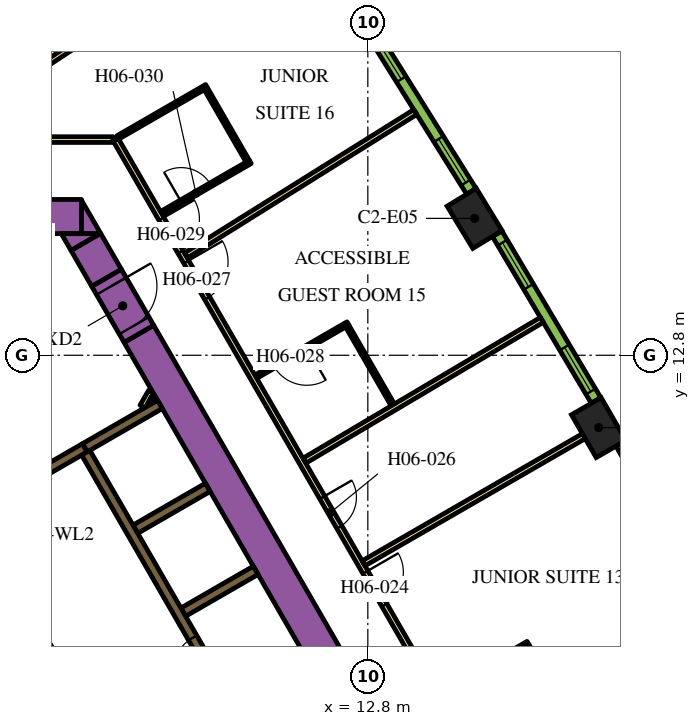
"""IFC4 building model, lengths in metres.
Left out: names, types, materials, properties, quantities, classifications, styles, units other than length and angle.
Written with IfcOpenShell. Run it as: python <this file> out.ifc"""

import sys

from ifc_helpers import new_model, si_unit, direction, frame, frame_2d, origin, origin_2d, place, context, subcontext, project, spatial, polyline, rectangle, outline, extrude, element, fill, save


model = new_model("IFC4")
c1 = context("Model", 3, precision=1e-05, world=origin(), true_north=direction((0.0, 1.0)))
c2 = subcontext(c1, "Body", "Model", "MODEL_VIEW")
j1 = project(units=[si_unit("LENGTHUNIT", "METRE"), si_unit("PLANEANGLEUNIT", "RADIAN")], contexts=[c1])
p1 = place(None, origin())
s1 = spatial("IfcSite", under=j1, at=p1, CompositionType="ELEMENT")
p2 = place(p1, origin())
s2 = spatial("IfcBuilding", under=s1, at=p2, CompositionType="ELEMENT")
p3 = place(p2, frame((0.0, 0.0, 87.6)))
s3 = spatial("IfcBuildingStorey", under=s2, at=p3, CompositionType="ELEMENT", Elevation=87.6)
for number, where, z_axis, x_axis in (
    (1, (18.874, 10.897, 0.0), (0.0, 0.0, 1.0), (-0.5, 0.866, 0.0)),
    (2, (15.609, 16.402, 0.0), (0.0, 0.0, 1.0), (-0.52, 0.854, 0.0)),
):
    element("IfcColumn", number, at=place(p3, frame(where, z_axis=z_axis, x_axis=x_axis)), inside=s3, PredefinedType="COLUMN", context=c2, shape_type="SweptSolid", body=[
        extrude(rectangle(XDim=1.3, YDim=0.9, at=origin_2d()), origin(), (0.0, 0.0, 1.0), 3.9),
    ])
p4 = place(p3, frame((6.776, 13.364, 0.0), z_axis=(0.0, 0.0, 1.0), x_axis=(0.500004177138, -0.8660229921, 0.0)))
e3 = element("IfcWall", 3, at=p4, inside=s3, PredefinedType="SOLIDWALL", context=c2, shape_type="SweptSolid", body=[
    extrude(rectangle(XDim=20.204, YDim=0.9, at=frame_2d((10.102, 0.0))), origin(), (0.0, 0.0, 1.0), 3.9),
])
p5 = place(p3, frame((-4.224, 16.45, 0.0), z_axis=(0.0, 0.0, 1.0), x_axis=(1.0, 0.0, 0.0)))
e4 = element("IfcWall", 4, at=p5, inside=s3, PredefinedType="SOLIDWALL", context=c2, shape_type="SweptSolid", body=[
    extrude(rectangle(XDim=9.488, YDim=0.9, at=frame_2d((4.744, 0.0))), origin(), (0.0, 0.0, 1.0), 3.9),
])
p6 = place(p3, origin())
e5 = element("IfcWall", 5, at=p6, inside=s3, PredefinedType="SOLIDWALL", context=c2, shape_type="SweptSolid", body=[
    extrude(outline(polyline([(5.265, 16.0), (5.265, 16.88), (5.773, 16.0), (5.265, 16.0)])), origin(), (0.0, 0.0, 1.0), 3.9),
])
p7 = place(p3, frame((5.926, 14.836, 0.0), z_axis=(0.0, 0.0, 1.0), x_axis=(-0.500076735116, 0.865981096212, 0.0)))
e6 = element("IfcWall", 6, at=p7, inside=s3, PredefinedType="SOLIDWALL", context=c2, shape_type="SweptSolid", body=[
    extrude(rectangle(XDim=1.094, YDim=0.9, at=frame_2d((0.547, 0.0))), origin(), (0.0, 0.0, 1.0), 3.9),
])
e7 = element("IfcWall", 7, at=p6, inside=s3, PredefinedType="SOLIDWALL", context=c2, shape_type="SweptSolid", body=[
    extrude(outline(polyline([(4.734, 16.0), (5.75, 16.0), (4.988, 15.56), (4.734, 16.0)])), origin(), (0.0, 0.0, 1.0), 3.9),
])
e8 = element("IfcWall", 8, at=p6, inside=s3, PredefinedType="SOLIDWALL", context=c2, shape_type="SweptSolid", body=[
    extrude(outline(polyline([(0.335, 6.925), (0.335, 7.075), (0.335, 7.075), (0.335, 7.075), (0.245, 7.075), (0.079, 7.363), (0.035, 7.439), (0.252, 7.564), (0.377, 7.348), (6.552, -3.348), (6.677, -3.564), (6.46, -3.689), (4.897, -0.981), (0.332, 6.925), (0.335, 6.925), (0.335, 6.925), (0.335, 6.925)])), origin(), (0.0, 0.0, 1.0), 3.9),
])
p8 = place(p3, frame((4.358, 9.791, 0.0), z_axis=(0.0, 0.0, 1.0), x_axis=(0.866079547155, 0.499906209203, 0.0)))
e9 = element("IfcWall", 9, at=p8, inside=s3, PredefinedType="SOLIDWALL", context=c2, shape_type="SweptSolid", body=[
    extrude(rectangle(XDim=1.15, YDim=0.25, at=frame_2d((0.575, 0.0))), origin(), (0.0, 0.0, 1.0), 3.9),
])
p9 = place(p3, frame((5.356, 10.367, 0.0), z_axis=(0.0, 0.0, 1.0), x_axis=(0.865978535641, 0.50008116922, 0.0)))
e10 = element("IfcWall", 10, at=p9, inside=s3, PredefinedType="SOLIDWALL", context=c2, shape_type="SweptSolid", body=[
    extrude(rectangle(XDim=2.278, YDim=0.25, at=frame_2d((1.139, 0.0))), origin(), (0.0, 0.0, 1.0), 3.9),
])
for number, where, z_axis, x_axis in (
    (11, (6.684, 8.224, 0.0), (0.0, 0.0, 1.0), (0.866, 0.5, 0.0)),
    (12, (7.944, 6.041, 0.0), (0.0, 0.0, 1.0), (0.866, 0.5, 0.0)),
):
    element("IfcWall", number, at=place(p3, frame(where, z_axis=z_axis, x_axis=x_axis)), inside=s3, PredefinedType="SOLIDWALL", context=c2, shape_type="SweptSolid", body=[
        extrude(rectangle(XDim=2.2, YDim=0.25, at=frame_2d((1.1, 0.0))), origin(), (0.0, 0.0, 1.0), 3.9),
    ])
p10 = place(p3, frame((6.872, 11.45, 0.0), z_axis=(0.0, 0.0, 1.0), x_axis=(0.499846793097, 0.866113839764, 0.0)))
e13 = element("IfcWall", 13, at=p10, inside=s3, PredefinedType="PARTITIONING", context=c2, shape_type="SweptSolid", body=[
    extrude(rectangle(XDim=0.453, YDim=0.15, at=frame_2d((0.227, 0.0))), origin(), (0.0, 0.0, 1.0), 2.75),
])
p11 = place(p3, frame((7.131, 11.6, 0.0), z_axis=(0.0, 0.0, 1.0), x_axis=(0.498600033135, 0.866832167699, 0.0)))
e14 = element("IfcWall", 14, at=p11, inside=s3, PredefinedType="PARTITIONING", context=c2, shape_type="SweptSolid", body=[
    extrude(rectangle(XDim=0.107, YDim=0.15, at=frame_2d((0.053, 0.0))), origin(), (0.0, 0.0, 1.0), 2.75),
])
p12 = place(p3, frame((11.553, -0.46, 0.0), z_axis=(0.0, 0.0, 1.0), x_axis=(-0.500006514828, 0.866021642414, 0.0)))
e15 = element("IfcWall", 15, at=p12, inside=s3, PredefinedType="SOLIDWALL", context=c2, shape_type="SweptSolid", body=[
    extrude(rectangle(XDim=12.35, YDim=0.25, at=frame_2d((6.175, 0.0))), origin(), (0.0, 0.0, 1.0), 3.9),
])
p13 = place(p12, frame((0.585, 0.0, 0.0)))
e16 = element("IfcOpeningElement", 16, at=p13, cuts=e15, PredefinedType="OPENING", context=c2, shape_type="SweptSolid", body=[
    extrude(rectangle(XDim=1.1, YDim=2.1, at=frame_2d((0.55, 1.05))), frame((0.0, 0.135, 0.0), z_axis=(0.0, -1.0, 0.0), x_axis=(1.0, 0.0, 0.0)), (0.0, 0.0, 1.0), 0.27),
])
p14 = place(p12, frame((3.105, 0.0, 0.0)))
e17 = element("IfcOpeningElement", 17, at=p14, cuts=e15, PredefinedType="OPENING", context=c2, shape_type="SweptSolid", body=[
    extrude(rectangle(XDim=1.1, YDim=2.1, at=frame_2d((0.55, 1.05))), frame((0.0, 0.135, 0.0), z_axis=(0.0, -1.0, 0.0), x_axis=(1.0, 0.0, 0.0)), (0.0, 0.0, 1.0), 0.27),
])
p15 = place(p12, frame((5.625, 0.0, 0.0)))
e18 = element("IfcOpeningElement", 18, at=p15, cuts=e15, PredefinedType="OPENING", context=c2, shape_type="SweptSolid", body=[
    extrude(rectangle(XDim=1.1, YDim=2.1, at=frame_2d((0.55, 1.05))), frame((0.0, 0.135, 0.0), z_axis=(0.0, -1.0, 0.0), x_axis=(1.0, 0.0, 0.0)), (0.0, 0.0, 1.0), 0.27),
])
p16 = place(p3, frame((8.565, -2.185, 0.0), z_axis=(0.0, 0.0, 1.0), x_axis=(-0.499997954832, 0.866026584559, 0.0)))
e19 = element("IfcWall", 19, at=p16, inside=s3, PredefinedType="SOLIDWALL", context=c2, shape_type="SweptSolid", body=[
    extrude(rectangle(XDim=12.35, YDim=0.25, at=frame_2d((6.175, 0.0))), origin(), (0.0, 0.0, 1.0), 3.9),
])
p17 = place(p16, frame((5.725, 0.0, 0.0)))
e20 = element("IfcOpeningElement", 20, at=p17, cuts=e19, PredefinedType="OPENING", context=c2, shape_type="SweptSolid", body=[
    extrude(rectangle(XDim=0.9, YDim=2.1, at=frame_2d((0.45, 1.05))), frame((0.0, 0.135, 0.0), z_axis=(0.0, -1.0, 0.0), x_axis=(1.0, 0.0, 0.0)), (0.0, 0.0, 1.0), 0.27),
])
p18 = place(p3, frame((5.926, 14.836, 0.0), z_axis=(0.0, 0.0, 1.0), x_axis=(0.500062241894, -0.865989465428, 0.0)))
e21 = element("IfcWall", 21, at=p18, inside=s3, PredefinedType="SOLIDWALL", context=c2, shape_type="SweptSolid", body=[
    extrude(rectangle(XDim=1.7, YDim=0.9, at=frame_2d((0.85, 0.0))), origin(), (0.0, 0.0, 1.0), 3.9),
])
p19 = place(p18, frame((0.25, 0.0, 0.0)))
e22 = element("IfcOpeningElement", 22, at=p19, cuts=e21, PredefinedType="OPENING", context=c2, shape_type="SweptSolid", body=[
    extrude(rectangle(XDim=1.2, YDim=2.1, at=frame_2d((0.6, 1.05))), frame((0.0, 0.46, 0.0), z_axis=(0.0, -1.0, 0.0), x_axis=(1.0, 0.0, 0.0)), (0.0, 0.0, 1.0), 0.92),
])
p20 = place(p3, frame((6.163, 18.475, 0.0), z_axis=(0.0, 0.0, 1.0), x_axis=(0.500001317485, -0.866024643133, 0.0)))
e23 = element("IfcWall", 23, at=p20, inside=s3, PredefinedType="PARTITIONING", context=c2, shape_type="SweptSolid", body=[
    extrude(rectangle(XDim=25.767, YDim=0.15, at=frame_2d((12.883, 0.0))), origin(), (0.0, 0.0, 1.0), 2.75),
])
p21 = place(p20, frame((24.241, 0.0, 0.0)))
e24 = element("IfcOpeningElement", 24, at=p21, cuts=e23, PredefinedType="OPENING", context=c2, shape_type="SweptSolid", body=[
    extrude(rectangle(XDim=1.0, YDim=2.1, at=frame_2d((0.5, 1.05))), frame((0.0, 0.085, 0.0), z_axis=(0.0, -1.0, 0.0), x_axis=(1.0, 0.0, 0.0)), (0.0, 0.0, 1.0), 0.17),
])
p22 = place(p20, frame((13.144, 0.0, 0.0)))
e25 = element("IfcOpeningElement", 25, at=p22, cuts=e23, PredefinedType="OPENING", context=c2, shape_type="SweptSolid", body=[
    extrude(rectangle(XDim=1.0, YDim=2.1, at=frame_2d((0.5, 1.05))), frame((0.0, 0.085, 0.0), z_axis=(0.0, -1.0, 0.0), x_axis=(1.0, 0.0, 0.0)), (0.0, 0.0, 1.0), 0.17),
])
p23 = place(p20, frame((10.874, 0.0, 0.0)))
e26 = element("IfcOpeningElement", 26, at=p23, cuts=e23, PredefinedType="OPENING", context=c2, shape_type="SweptSolid", body=[
    extrude(rectangle(XDim=0.9, YDim=2.1, at=frame_2d((0.45, 1.05))), frame((0.0, 0.085, 0.0), z_axis=(0.0, -1.0, 0.0), x_axis=(1.0, 0.0, 0.0)), (0.0, 0.0, 1.0), 0.17),
])
p24 = place(p20, frame((3.718, 0.0, 0.0)))
e27 = element("IfcOpeningElement", 27, at=p24, cuts=e23, PredefinedType="OPENING", context=c2, shape_type="SweptSolid", body=[
    extrude(rectangle(XDim=1.1, YDim=2.1, at=frame_2d((0.55, 1.05))), frame((0.0, 0.085, 0.0), z_axis=(0.0, -1.0, 0.0), x_axis=(1.0, 0.0, 0.0)), (0.0, 0.0, 1.0), 0.17),
])
p25 = place(p20, frame((2.411, 0.0, 0.0)))
e28 = element("IfcOpeningElement", 28, at=p25, cuts=e23, PredefinedType="OPENING", context=c2, shape_type="SweptSolid", body=[
    extrude(rectangle(XDim=1.0, YDim=2.1, at=frame_2d((0.5, 1.05))), frame((0.0, 0.085, 0.0), z_axis=(0.0, -1.0, 0.0), x_axis=(1.0, 0.0, 0.0)), (0.0, 0.0, 1.0), 0.17),
])
p26 = place(p3, frame((0.825, 18.475, 0.0), z_axis=(0.0, 0.0, 1.0), x_axis=(1.0, 0.0, 0.0)))
e29 = element("IfcWall", 29, at=p26, inside=s3, PredefinedType="PARTITIONING", context=c2, shape_type="SweptSolid", body=[
    extrude(rectangle(XDim=5.268, YDim=0.15, at=frame_2d((2.634, 0.0))), origin(), (0.0, 0.0, 1.0), 2.75),
])
p27 = place(p3, frame((10.592, 24.589, 0.0), z_axis=(0.0, 0.0, 1.0), x_axis=(-0.835337323748, -0.549737715236, 0.0)))
e30 = element("IfcWall", 30, at=p27, inside=s3, PredefinedType="PARTITIONING", context=c2, shape_type="SweptSolid", body=[
    extrude(rectangle(XDim=10.875, YDim=0.15, at=frame_2d((5.438, 0.0))), origin(), (0.0, 0.0, 1.0), 2.75),
])
p28 = place(p3, frame((14.049, 19.2, 0.0), z_axis=(0.0, 0.0, 1.0), x_axis=(-0.847955867271, -0.530066832731, 0.0)))
e31 = element("IfcWall", 31, at=p28, inside=s3, PredefinedType="PARTITIONING", context=c2, shape_type="SweptSolid", body=[
    extrude(rectangle(XDim=7.111, YDim=0.15, at=frame_2d((3.556, 0.0))), origin(), (0.0, 0.0, 1.0), 2.75),
])
p29 = place(p3, frame((17.379, 13.731, 0.0), z_axis=(0.0, 0.0, 1.0), x_axis=(-0.860132461691, -0.510070728768, 0.0)))
e32 = element("IfcWall", 32, at=p29, inside=s3, PredefinedType="PARTITIONING", context=c2, shape_type="SweptSolid", body=[
    extrude(rectangle(XDim=7.257, YDim=0.15, at=frame_2d((3.628, 0.0))), origin(), (0.0, 0.0, 1.0), 2.75),
])
p30 = place(p3, frame((18.484, 10.672, 0.0), z_axis=(0.0, 0.0, 1.0), x_axis=(-0.866019162053, -0.50001081084, 0.0)))
e33 = element("IfcWall", 33, at=p30, inside=s3, PredefinedType="PARTITIONING", context=c2, shape_type="SweptSolid", body=[
    extrude(rectangle(XDim=6.694, YDim=0.15, at=frame_2d((3.347, 0.0))), origin(), (0.0, 0.0, 1.0), 2.75),
])
p31 = place(p3, frame((21.614, 5.102, 0.0), z_axis=(0.0, 0.0, 1.0), x_axis=(-0.877484555087, -0.479604895287, 0.0)))
e34 = element("IfcWall", 34, at=p31, inside=s3, PredefinedType="PARTITIONING", context=c2, shape_type="SweptSolid", body=[
    extrude(rectangle(XDim=6.611, YDim=0.15, at=frame_2d((3.306, 0.0))), origin(), (0.0, 0.0, 1.0), 2.75),
])
p32 = place(p3, frame((17.016, 5.228, 0.0), z_axis=(0.0, 0.0, 1.0), x_axis=(-0.86599734893, -0.500048589285, 0.0)))
e35 = element("IfcWall", 35, at=p32, inside=s3, PredefinedType="PARTITIONING", context=c2, shape_type="SweptSolid", body=[
    extrude(rectangle(XDim=2.7, YDim=0.1, at=frame_2d((1.35, 0.0))), origin(), (0.0, 0.0, 1.0), 2.75),
])
p33 = place(p32, frame((1.2, 0.0, 0.0)))
e36 = element("IfcOpeningElement", 36, at=p33, cuts=e35, PredefinedType="OPENING", context=c2, shape_type="SweptSolid", body=[
    extrude(rectangle(XDim=0.9, YDim=2.1, at=frame_2d((0.45, 1.05))), frame((0.0, 0.06, 0.0), z_axis=(0.0, -1.0, 0.0), x_axis=(1.0, 0.0, 0.0)), (0.0, 0.0, 1.0), 0.12),
])
p34 = place(p3, frame((16.997, 5.16, 0.0), z_axis=(0.0, 0.0, 1.0), x_axis=(0.500011965869, -0.866018495177, 0.0)))
e37 = element("IfcWall", 37, at=p34, inside=s3, PredefinedType="PARTITIONING", context=c2, shape_type="SweptSolid", body=[
    extrude(rectangle(XDim=2.19, YDim=0.1, at=frame_2d((1.095, 0.0))), origin(), (0.0, 0.0, 1.0), 2.75),
])
p35 = place(p3, frame((12.277, 13.635, 0.0), z_axis=(0.0, 0.0, 1.0), x_axis=(-0.866034573852, -0.49998411664, 0.0)))
e38 = element("IfcWall", 38, at=p35, inside=s3, PredefinedType="PARTITIONING", context=c2, shape_type="SweptSolid", body=[
    extrude(rectangle(XDim=2.8, YDim=0.1, at=frame_2d((1.4, 0.0))), origin(), (0.0, 0.0, 1.0), 2.75),
])
p36 = place(p35, frame((1.25, 0.0, 0.0)))
e39 = element("IfcOpeningElement", 39, at=p36, cuts=e38, PredefinedType="OPENING", context=c2, shape_type="SweptSolid", body=[
    extrude(rectangle(XDim=1.0, YDim=2.1, at=frame_2d((0.5, 1.05))), frame((0.0, 0.06, 0.0), z_axis=(0.0, -1.0, 0.0), x_axis=(1.0, 0.0, 0.0)), (0.0, 0.0, 1.0), 0.12),
])
p37 = place(p3, frame((12.259, 13.567, 0.0), z_axis=(0.0, 0.0, 1.0), x_axis=(0.500017192868, -0.86601547725, 0.0)))
e40 = element("IfcWall", 40, at=p37, inside=s3, PredefinedType="PARTITIONING", context=c2, shape_type="SweptSolid", body=[
    extrude(rectangle(XDim=2.39, YDim=0.1, at=frame_2d((1.195, 0.0))), origin(), (0.0, 0.0, 1.0), 2.75),
])
p38 = place(p3, frame((7.368, 16.538, 0.0), z_axis=(0.0, 0.0, 1.0), x_axis=(0.866036505625, 0.499980770555, 0.0)))
e41 = element("IfcWall", 41, at=p38, inside=s3, PredefinedType="PARTITIONING", context=c2, shape_type="SweptSolid", body=[
    extrude(rectangle(XDim=2.7, YDim=0.1, at=frame_2d((1.35, 0.0))), origin(), (0.0, 0.0, 1.0), 2.75),
])
p39 = place(p38, frame((0.6, 0.0, 0.0)))
e42 = element("IfcOpeningElement", 42, at=p39, cuts=e41, PredefinedType="OPENING", context=c2, shape_type="SweptSolid", body=[
    extrude(rectangle(XDim=0.9, YDim=2.1, at=frame_2d((0.45, 1.05))), frame((0.0, 0.06, 0.0), z_axis=(0.0, -1.0, 0.0), x_axis=(1.0, 0.0, 0.0)), (0.0, 0.0, 1.0), 0.12),
])
p40 = place(p3, frame((9.638, 17.906, 0.0), z_axis=(0.0, 0.0, 1.0), x_axis=(-0.50002983664, 0.866008176907, 0.0)))
e43 = element("IfcWall", 43, at=p40, inside=s3, PredefinedType="PARTITIONING", context=c2, shape_type="SweptSolid", body=[
    extrude(rectangle(XDim=2.2, YDim=0.1, at=frame_2d((1.1, 0.0))), origin(), (0.0, 0.0, 1.0), 2.75),
])
p41 = place(p3, frame((6.218, 18.53, 0.0), z_axis=(0.0, 0.0, 1.0), x_axis=(0.86599734893, 0.500048589285, 0.0)))
e44 = element("IfcWall", 44, at=p41, inside=s3, PredefinedType="PARTITIONING", context=c2, shape_type="SweptSolid", body=[
    extrude(rectangle(XDim=2.7, YDim=0.1, at=frame_2d((1.35, 0.0))), origin(), (0.0, 0.0, 1.0), 2.75),
])
p42 = place(p3, frame((21.956, 6.033, 0.0), z_axis=(0.0, 0.0, 1.0), x_axis=(-0.48983164787, 0.87181704316, 0.0)))
e45 = element("IfcWall", 45, at=p42, inside=s3, PredefinedType="SOLIDWALL", context=c2, shape_type="SweptSolid", body=[
    extrude(rectangle(XDim=5.1, YDim=0.29, at=frame_2d((2.55, 0.0))), origin(), (0.0, 0.0, 1.0), 3.65),
])
p43 = place(p42, frame((0.273, 0.0, 0.9)))
e46 = element("IfcOpeningElement", 46, at=p43, cuts=e45, PredefinedType="OPENING", context=c2, shape_type="SweptSolid", body=[
    extrude(rectangle(XDim=1.35, YDim=2.15, at=frame_2d((0.675, 1.075))), frame((0.0, 0.155, 0.0), z_axis=(0.0, -1.0, 0.0), x_axis=(1.0, 0.0, 0.0)), (0.0, 0.0, 1.0), 0.31),
])
p44 = place(p42, frame((3.478, 0.0, 0.9)))
e47 = element("IfcOpeningElement", 47, at=p44, cuts=e45, PredefinedType="OPENING", context=c2, shape_type="SweptSolid", body=[
    extrude(rectangle(XDim=1.35, YDim=2.15, at=frame_2d((0.675, 1.075))), frame((0.0, 0.155, 0.0), z_axis=(0.0, -1.0, 0.0), x_axis=(1.0, 0.0, 0.0)), (0.0, 0.0, 1.0), 0.31),
])
p45 = place(p3, frame((18.805, 11.611, 0.0), z_axis=(0.0, 0.0, 1.0), x_axis=(-0.510054281659, 0.860142214847, 0.0)))
e48 = element("IfcWall", 48, at=p45, inside=s3, PredefinedType="SOLIDWALL", context=c2, shape_type="SweptSolid", body=[
    extrude(rectangle(XDim=5.101, YDim=0.29, at=frame_2d((2.55, 0.0))), origin(), (0.0, 0.0, 1.0), 3.65),
])
p46 = place(p45, frame((0.273, 0.0, 0.9)))
e49 = element("IfcOpeningElement", 49, at=p46, cuts=e48, PredefinedType="OPENING", context=c2, shape_type="SweptSolid", body=[
    extrude(rectangle(XDim=1.35, YDim=2.15, at=frame_2d((0.675, 1.075))), frame((0.0, 0.155, 0.0), z_axis=(0.0, -1.0, 0.0), x_axis=(1.0, 0.0, 0.0)), (0.0, 0.0, 1.0), 0.31),
])
p47 = place(p45, frame((3.478, 0.0, 0.9)))
e50 = element("IfcOpeningElement", 50, at=p47, cuts=e48, PredefinedType="OPENING", context=c2, shape_type="SweptSolid", body=[
    extrude(rectangle(XDim=1.35, YDim=2.15, at=frame_2d((0.675, 1.075))), frame((0.0, 0.155, 0.0), z_axis=(0.0, -1.0, 0.0), x_axis=(1.0, 0.0, 0.0)), (0.0, 0.0, 1.0), 0.31),
])
p48 = place(p3, frame((15.524, 17.114, 0.0), z_axis=(0.0, 0.0, 1.0), x_axis=(-0.530072082134, 0.847952585787, 0.0)))
e51 = element("IfcWall", 51, at=p48, inside=s3, PredefinedType="SOLIDWALL", context=c2, shape_type="SweptSolid", body=[
    extrude(rectangle(XDim=5.1, YDim=0.29, at=frame_2d((2.55, 0.0))), origin(), (0.0, 0.0, 1.0), 3.65),
])
p49 = place(p48, frame((0.273, 0.0, 0.9)))
e52 = element("IfcOpeningElement", 52, at=p49, cuts=e51, PredefinedType="OPENING", context=c2, shape_type="SweptSolid", body=[
    extrude(rectangle(XDim=1.35, YDim=2.15, at=frame_2d((0.675, 1.075))), frame((0.0, 0.155, 0.0), z_axis=(0.0, -1.0, 0.0), x_axis=(1.0, 0.0, 0.0)), (0.0, 0.0, 1.0), 0.31),
])
p50 = place(p48, frame((3.478, 0.0, 0.9)))
e53 = element("IfcOpeningElement", 53, at=p50, cuts=e51, PredefinedType="OPENING", context=c2, shape_type="SweptSolid", body=[
    extrude(rectangle(XDim=1.35, YDim=2.15, at=frame_2d((0.675, 1.075))), frame((0.0, 0.155, 0.0), z_axis=(0.0, -1.0, 0.0), x_axis=(1.0, 0.0, 0.0)), (0.0, 0.0, 1.0), 0.31),
])
p51 = place(p15, origin())
e54 = element("IfcDoor", 54, at=p51, inside=s3, OperationType="DOUBLE_DOOR_SLIDING", PredefinedType="DOOR", context=c2, shape_type="SweptSolid", body=[
    extrude(rectangle(XDim=1.1, YDim=2.1, at=frame_2d((0.55, 1.05))), frame((0.0, 0.025, 0.0), z_axis=(0.0, -1.0, 0.0), x_axis=(1.0, 0.0, 0.0)), (0.0, 0.0, 1.0), 0.05),
])
fill(e18, e54)
p52 = place(p19, origin())
e55 = element("IfcDoor", 55, at=p52, inside=s3, OperationType="SINGLE_SWING_LEFT", PredefinedType="DOOR", context=c2, shape_type="SweptSolid", body=[
    extrude(rectangle(XDim=1.2, YDim=2.1, at=frame_2d((0.6, 1.05))), frame((0.0, 0.025, 0.0), z_axis=(0.0, -1.0, 0.0), x_axis=(1.0, 0.0, 0.0)), (0.0, 0.0, 1.0), 0.05),
])
fill(e22, e55)
p53 = place(p22, origin())
e56 = element("IfcDoor", 56, at=p53, inside=s3, OperationType="SINGLE_SWING_LEFT", PredefinedType="DOOR", context=c2, shape_type="SweptSolid", body=[
    extrude(rectangle(XDim=1.0, YDim=2.1, at=frame_2d((0.5, 1.05))), frame((0.0, 0.025, 0.0), z_axis=(0.0, -1.0, 0.0), x_axis=(1.0, 0.0, 0.0)), (0.0, 0.0, 1.0), 0.05),
])
fill(e25, e56)
p54 = place(p23, origin())
e57 = element("IfcDoor", 57, at=p54, inside=s3, OperationType="SINGLE_SWING_RIGHT", PredefinedType="DOOR", context=c2, shape_type="SweptSolid", body=[
    extrude(rectangle(XDim=0.9, YDim=2.1, at=frame_2d((0.45, 1.05))), frame((0.0, 0.025, 0.0), z_axis=(0.0, -1.0, 0.0), x_axis=(1.0, 0.0, 0.0)), (0.0, 0.0, 1.0), 0.05),
])
fill(e26, e57)
p55 = place(p24, origin())
e58 = element("IfcDoor", 58, at=p55, inside=s3, OperationType="SINGLE_SWING_LEFT", PredefinedType="DOOR", context=c2, shape_type="SweptSolid", body=[
    extrude(rectangle(XDim=1.1, YDim=2.1, at=frame_2d((0.55, 1.05))), frame((0.0, 0.025, 0.0), z_axis=(0.0, -1.0, 0.0), x_axis=(1.0, 0.0, 0.0)), (0.0, 0.0, 1.0), 0.05),
])
fill(e27, e58)
p56 = place(p36, origin())
e59 = element("IfcDoor", 59, at=p56, inside=s3, OperationType="SINGLE_SWING_RIGHT", PredefinedType="DOOR", context=c2, shape_type="SweptSolid", body=[
    extrude(rectangle(XDim=1.0, YDim=2.1, at=frame_2d((0.5, 1.05))), frame((0.0, 0.025, 0.0), z_axis=(0.0, -1.0, 0.0), x_axis=(1.0, 0.0, 0.0)), (0.0, 0.0, 1.0), 0.05),
])
fill(e39, e59)
p57 = place(p25, origin())
e60 = element("IfcDoor", 60, at=p57, inside=s3, OperationType="SINGLE_SWING_RIGHT", PredefinedType="DOOR", context=c2, shape_type="SweptSolid", body=[
    extrude(rectangle(XDim=1.0, YDim=2.1, at=frame_2d((0.5, 1.05))), frame((0.0, 0.025, 0.0), z_axis=(0.0, -1.0, 0.0), x_axis=(1.0, 0.0, 0.0)), (0.0, 0.0, 1.0), 0.05),
])
fill(e28, e60)
p58 = place(p39, origin())
e61 = element("IfcDoor", 61, at=p58, inside=s3, OperationType="SINGLE_SWING_LEFT", PredefinedType="DOOR", context=c2, shape_type="SweptSolid", body=[
    extrude(rectangle(XDim=0.9, YDim=2.1, at=frame_2d((0.45, 1.05))), frame((0.0, 0.025, 0.0), z_axis=(0.0, -1.0, 0.0), x_axis=(1.0, 0.0, 0.0)), (0.0, 0.0, 1.0), 0.05),
])
fill(e42, e61)
p59 = place(p46, origin())
e62 = element("IfcWindow", 62, at=p59, inside=s3, PartitioningType="DOUBLE_PANEL_VERTICAL", PredefinedType="WINDOW", context=c2, shape_type="SweptSolid", body=[
    extrude(rectangle(XDim=1.35, YDim=2.15, at=frame_2d((0.675, 1.075))), frame((0.0, 0.015, 0.0), z_axis=(0.0, -1.0, 0.0), x_axis=(1.0, 0.0, 0.0)), (0.0, 0.0, 1.0), 0.06),
])
fill(e49, e62)
p60 = place(p47, origin())
e63 = element("IfcWindow", 63, at=p60, inside=s3, PartitioningType="DOUBLE_PANEL_VERTICAL", PredefinedType="WINDOW", context=c2, shape_type="SweptSolid", body=[
    extrude(rectangle(XDim=1.35, YDim=2.15, at=frame_2d((0.675, 1.075))), frame((0.0, 0.015, 0.0), z_axis=(0.0, -1.0, 0.0), x_axis=(1.0, 0.0, 0.0)), (0.0, 0.0, 1.0), 0.06),
])
fill(e50, e63)
p61 = place(p49, origin())
e64 = element("IfcWindow", 64, at=p61, inside=s3, PartitioningType="DOUBLE_PANEL_VERTICAL", PredefinedType="WINDOW", context=c2, shape_type="SweptSolid", body=[
    extrude(rectangle(XDim=1.35, YDim=2.15, at=frame_2d((0.675, 1.075))), frame((0.0, 0.015, 0.0), z_axis=(0.0, -1.0, 0.0), x_axis=(1.0, 0.0, 0.0)), (0.0, 0.0, 1.0), 0.06),
])
fill(e52, e64)
p62 = place(p50, origin())
e65 = element("IfcWindow", 65, at=p62, inside=s3, PartitioningType="DOUBLE_PANEL_VERTICAL", PredefinedType="WINDOW", context=c2, shape_type="SweptSolid", body=[
    extrude(rectangle(XDim=1.35, YDim=2.15, at=frame_2d((0.675, 1.075))), frame((0.0, 0.015, 0.0), z_axis=(0.0, -1.0, 0.0), x_axis=(1.0, 0.0, 0.0)), (0.0, 0.0, 1.0), 0.06),
])
fill(e53, e65)
save(model, sys.argv[1])
